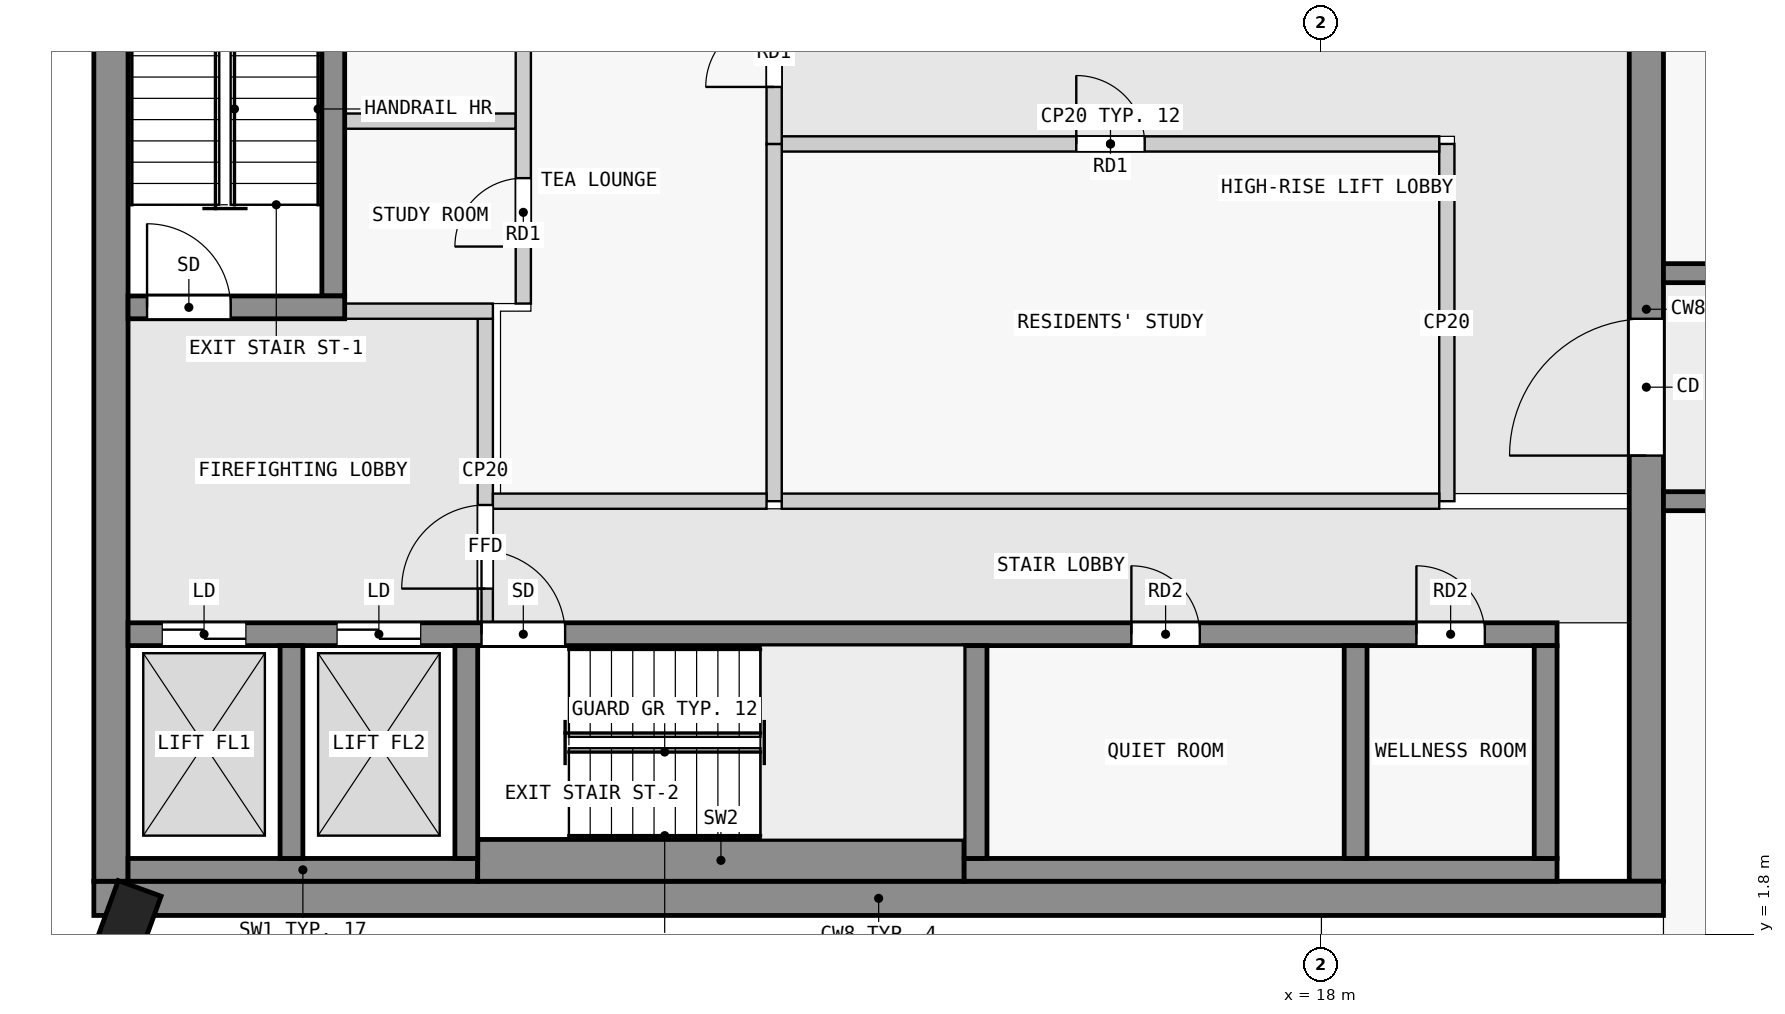
"""IFC4 building model, lengths in metres.
Left out: names, types, materials, properties, quantities, classifications, styles, units other than length and angle.
Written with IfcOpenShell. Run it as: python <this file> out.ifc"""

import sys

from ifc_helpers import new_model, si_unit, direction, frame, frame_2d, origin, origin_2d, place, context, subcontext, project, spatial, rectangle, extrude, element, fill, save


model = new_model("IFC4")
c1 = context("Model", 3, precision=1e-05, world=origin(), true_north=direction((0.0, 1.0)))
c2 = subcontext(c1, "Body", "Model", "MODEL_VIEW")
j1 = project(units=[si_unit("LENGTHUNIT", "METRE"), si_unit("PLANEANGLEUNIT", "RADIAN")], contexts=[c1])
p1 = place(None, origin())
s1 = spatial("IfcSite", under=j1, at=p1, CompositionType="ELEMENT")
p2 = place(p1, origin())
s2 = spatial("IfcBuilding", under=s1, at=p2, CompositionType="ELEMENT")
p3 = place(p2, frame((0.0, 0.0, 273.9)))
s3 = spatial("IfcBuildingStorey", under=s2, at=p3, CompositionType="ELEMENT", Elevation=273.9)
p4 = place(p3, frame((2.213, 1.748, 0.0), z_axis=(0.0, 0.0, 1.0), x_axis=(-0.939664280925, 0.342097996418, 0.0)))
e1 = element("IfcColumn", 1, at=p4, inside=s3, PredefinedType="COLUMN", context=c2, shape_type="SweptSolid", body=[
    extrude(rectangle(XDim=0.6, YDim=1.4, at=origin_2d()), origin(), (0.0, 0.0, 1.0), 3.5),
])
p5 = place(p3, frame((1.85, 2.275, 0.0), z_axis=(0.0, 0.0, 1.0), x_axis=(1.0, 0.0, 0.0)))
e2 = element("IfcWall", 2, at=p5, inside=s3, PredefinedType="SHEAR", context=c2, shape_type="SweptSolid", body=[
    extrude(rectangle(XDim=20.65, YDim=0.45, at=frame_2d((10.325, 0.0))), origin(), (0.0, 0.0, 1.0), 3.25),
])
p6 = place(p3, frame((2.075, 2.5, 0.0), z_axis=(0.0, 0.0, 1.0), x_axis=(0.0, 1.0, 0.0)))
e3 = element("IfcWall", 3, at=p6, inside=s3, PredefinedType="SHEAR", context=c2, shape_type="SweptSolid", body=[
    extrude(rectangle(XDim=15.05, YDim=0.45, at=frame_2d((7.525, 0.0))), origin(), (0.0, 0.0, 1.0), 3.25),
])
p7 = place(p3, frame((22.275, 2.5, 0.0), z_axis=(0.0, 0.0, 1.0), x_axis=(0.0, 1.0, 0.0)))
e4 = element("IfcWall", 4, at=p7, inside=s3, PredefinedType="SHEAR", context=c2, shape_type="SweptSolid", body=[
    extrude(rectangle(XDim=15.05, YDim=0.45, at=frame_2d((7.525, 0.0))), origin(), (0.0, 0.0, 1.0), 3.25),
])
p8 = place(p7, frame((5.6, 0.0, 0.0)))
e5 = element("IfcOpeningElement", 5, at=p8, cuts=e4, PredefinedType="OPENING", context=c2, shape_type="SweptSolid", body=[
    extrude(rectangle(XDim=1.8, YDim=2.1, at=frame_2d((0.9, 1.05))), frame((0.0, 0.235, 0.0), z_axis=(0.0, -1.0, 0.0), x_axis=(1.0, 0.0, 0.0)), (0.0, 0.0, 1.0), 0.47),
])
p9 = place(p3, frame((2.3, 2.65, 0.0), z_axis=(0.0, 0.0, 1.0), x_axis=(1.0, 0.0, 0.0)))
e6 = element("IfcWall", 6, at=p9, inside=s3, PredefinedType="SHEAR", context=c2, shape_type="SweptSolid", body=[
    extrude(rectangle(XDim=4.6, YDim=0.3, at=frame_2d((2.3, 0.0))), origin(), (0.0, 0.0, 1.0), 3.25),
])
p10 = place(p3, frame((6.9, 2.775, 0.0), z_axis=(0.0, 0.0, 1.0), x_axis=(1.0, 0.0, 0.0)))
e7 = element("IfcWall", 7, at=p10, inside=s3, PredefinedType="SHEAR", context=c2, shape_type="SweptSolid", body=[
    extrude(rectangle(XDim=6.4, YDim=0.55, at=frame_2d((3.2, 0.0))), origin(), (0.0, 0.0, 1.0), 3.25),
])
p11 = place(p3, frame((13.3, 2.65, 0.0), z_axis=(0.0, 0.0, 1.0), x_axis=(1.0, 0.0, 0.0)))
e8 = element("IfcWall", 8, at=p11, inside=s3, PredefinedType="SHEAR", context=c2, shape_type="SweptSolid", body=[
    extrude(rectangle(XDim=7.8, YDim=0.3, at=frame_2d((3.9, 0.0))), origin(), (0.0, 0.0, 1.0), 3.25),
])
for number, where, z_axis, x_axis in (
    (9, (4.45, 2.8, 0.0), (0.0, 0.0, 1.0), (0.0, 1.0, 0.0)),
    (10, (6.75, 2.8, 0.0), (0.0, 0.0, 1.0), (0.0, 1.0, 0.0)),
    (11, (13.45, 2.8, 0.0), (0.0, 0.0, 1.0), (0.0, 1.0, 0.0)),
    (12, (18.45, 2.8, 0.0), (0.0, 0.0, 1.0), (0.0, 1.0, 0.0)),
    (13, (20.95, 2.8, 0.0), (0.0, 0.0, 1.0), (0.0, 1.0, 0.0)),
):
    element("IfcWall", number, at=place(p3, frame(where, z_axis=z_axis, x_axis=x_axis)), inside=s3, PredefinedType="SHEAR", context=c2, shape_type="SweptSolid", body=[
        extrude(rectangle(XDim=2.8, YDim=0.3, at=frame_2d((1.4, 0.0))), origin(), (0.0, 0.0, 1.0), 3.25),
    ])
p12 = place(p3, frame((2.3, 5.75, 0.0), z_axis=(0.0, 0.0, 1.0), x_axis=(1.0, 0.0, 0.0)))
e14 = element("IfcWall", 14, at=p12, inside=s3, PredefinedType="SHEAR", context=c2, shape_type="SweptSolid", body=[
    extrude(rectangle(XDim=18.8, YDim=0.3, at=frame_2d((9.4, 0.0))), origin(), (0.0, 0.0, 1.0), 3.25),
])
p13 = place(p12, frame((4.65, 0.0, 0.0)))
e15 = element("IfcOpeningElement", 15, at=p13, cuts=e14, PredefinedType="OPENING", context=c2, shape_type="SweptSolid", body=[
    extrude(rectangle(XDim=1.1, YDim=2.1, at=frame_2d((0.55, 1.05))), frame((0.0, 0.16, 0.0), z_axis=(0.0, -1.0, 0.0), x_axis=(1.0, 0.0, 0.0)), (0.0, 0.0, 1.0), 0.32),
])
p14 = place(p12, frame((0.45, 0.0, 0.0)))
e16 = element("IfcOpeningElement", 16, at=p14, cuts=e14, PredefinedType="OPENING", context=c2, shape_type="SweptSolid", body=[
    extrude(rectangle(XDim=1.1, YDim=2.1, at=frame_2d((0.55, 1.05))), frame((0.0, 0.16, 0.0), z_axis=(0.0, -1.0, 0.0), x_axis=(1.0, 0.0, 0.0)), (0.0, 0.0, 1.0), 0.32),
])
p15 = place(p12, frame((2.75, 0.0, 0.0)))
e17 = element("IfcOpeningElement", 17, at=p15, cuts=e14, PredefinedType="OPENING", context=c2, shape_type="SweptSolid", body=[
    extrude(rectangle(XDim=1.1, YDim=2.1, at=frame_2d((0.55, 1.05))), frame((0.0, 0.16, 0.0), z_axis=(0.0, -1.0, 0.0), x_axis=(1.0, 0.0, 0.0)), (0.0, 0.0, 1.0), 0.32),
])
p16 = place(p12, frame((13.2, 0.0, 0.0)))
e18 = element("IfcOpeningElement", 18, at=p16, cuts=e14, PredefinedType="OPENING", context=c2, shape_type="SweptSolid", body=[
    extrude(rectangle(XDim=0.9, YDim=2.1, at=frame_2d((0.45, 1.05))), frame((0.0, 0.16, 0.0), z_axis=(0.0, -1.0, 0.0), x_axis=(1.0, 0.0, 0.0)), (0.0, 0.0, 1.0), 0.32),
])
p17 = place(p12, frame((16.95, 0.0, 0.0)))
e19 = element("IfcOpeningElement", 19, at=p17, cuts=e14, PredefinedType="OPENING", context=c2, shape_type="SweptSolid", body=[
    extrude(rectangle(XDim=0.9, YDim=2.1, at=frame_2d((0.45, 1.05))), frame((0.0, 0.16, 0.0), z_axis=(0.0, -1.0, 0.0), x_axis=(1.0, 0.0, 0.0)), (0.0, 0.0, 1.0), 0.32),
])
p18 = place(p3, frame((2.3, 10.05, 0.0), z_axis=(0.0, 0.0, 1.0), x_axis=(1.0, 0.0, 0.0)))
e20 = element("IfcWall", 20, at=p18, inside=s3, PredefinedType="SHEAR", context=c2, shape_type="SweptSolid", body=[
    extrude(rectangle(XDim=2.85, YDim=0.3, at=frame_2d((1.425, 0.0))), origin(), (0.0, 0.0, 1.0), 3.25),
])
p19 = place(p18, frame((0.25, 0.0, 0.0)))
e21 = element("IfcOpeningElement", 21, at=p19, cuts=e20, PredefinedType="OPENING", context=c2, shape_type="SweptSolid", body=[
    extrude(rectangle(XDim=1.1, YDim=2.1, at=frame_2d((0.55, 1.05))), frame((0.0, 0.16, 0.0), z_axis=(0.0, -1.0, 0.0), x_axis=(1.0, 0.0, 0.0)), (0.0, 0.0, 1.0), 0.32),
])
p20 = place(p3, frame((5.0, 10.2, 0.0), z_axis=(0.0, 0.0, 1.0), x_axis=(0.0, 1.0, 0.0)))
e22 = element("IfcWall", 22, at=p20, inside=s3, PredefinedType="SHEAR", context=c2, shape_type="SweptSolid", body=[
    extrude(rectangle(XDim=6.4, YDim=0.3, at=frame_2d((3.2, 0.0))), origin(), (0.0, 0.0, 1.0), 3.25),
])
p21 = place(p3, frame((22.5, 7.5, 0.0), z_axis=(0.0, 0.0, 1.0), x_axis=(1.0, 0.0, 0.0)))
e23 = element("IfcWall", 23, at=p21, inside=s3, PredefinedType="SHEAR", context=c2, shape_type="SweptSolid", body=[
    extrude(rectangle(XDim=22.5, YDim=0.25, at=frame_2d((11.25, 0.0))), origin(), (0.0, 0.0, 1.0), 3.25),
])
p22 = place(p21, frame((1.85, 0.0, 0.0)))
e24 = element("IfcOpeningElement", 24, at=p22, cuts=e23, PredefinedType="OPENING", context=c2, shape_type="SweptSolid", body=[
    extrude(rectangle(XDim=0.9, YDim=2.1, at=frame_2d((0.45, 1.05))), frame((0.0, 0.135, 0.0), z_axis=(0.0, -1.0, 0.0), x_axis=(1.0, 0.0, 0.0)), (0.0, 0.0, 1.0), 0.27),
])
p23 = place(p21, frame((6.25, 0.0, 0.0)))
e25 = element("IfcOpeningElement", 25, at=p23, cuts=e23, PredefinedType="OPENING", context=c2, shape_type="SweptSolid", body=[
    extrude(rectangle(XDim=1.0, YDim=2.1, at=frame_2d((0.5, 1.05))), frame((0.0, 0.135, 0.0), z_axis=(0.0, -1.0, 0.0), x_axis=(1.0, 0.0, 0.0)), (0.0, 0.0, 1.0), 0.27),
])
p24 = place(p21, frame((10.35, 0.0, 0.0)))
e26 = element("IfcOpeningElement", 26, at=p24, cuts=e23, PredefinedType="OPENING", context=c2, shape_type="SweptSolid", body=[
    extrude(rectangle(XDim=1.8, YDim=2.1, at=frame_2d((0.9, 1.05))), frame((0.0, 0.135, 0.0), z_axis=(0.0, -1.0, 0.0), x_axis=(1.0, 0.0, 0.0)), (0.0, 0.0, 1.0), 0.27),
])
p25 = place(p21, frame((16.85, 0.0, 0.0)))
e27 = element("IfcOpeningElement", 27, at=p25, cuts=e23, PredefinedType="OPENING", context=c2, shape_type="SweptSolid", body=[
    extrude(rectangle(XDim=1.0, YDim=2.1, at=frame_2d((0.5, 1.05))), frame((0.0, 0.135, 0.0), z_axis=(0.0, -1.0, 0.0), x_axis=(1.0, 0.0, 0.0)), (0.0, 0.0, 1.0), 0.27),
])
p26 = place(p3, frame((22.5, 10.5, 0.0), z_axis=(0.0, 0.0, 1.0), x_axis=(1.0, 0.0, 0.0)))
e28 = element("IfcWall", 28, at=p26, inside=s3, PredefinedType="SHEAR", context=c2, shape_type="SweptSolid", body=[
    extrude(rectangle(XDim=22.5, YDim=0.25, at=frame_2d((11.25, 0.0))), origin(), (0.0, 0.0, 1.0), 3.25),
])
p27 = place(p26, frame((1.85, 0.0, 0.0)))
e29 = element("IfcOpeningElement", 29, at=p27, cuts=e28, PredefinedType="OPENING", context=c2, shape_type="SweptSolid", body=[
    extrude(rectangle(XDim=0.9, YDim=2.1, at=frame_2d((0.45, 1.05))), frame((0.0, 0.135, 0.0), z_axis=(0.0, -1.0, 0.0), x_axis=(1.0, 0.0, 0.0)), (0.0, 0.0, 1.0), 0.27),
])
p28 = place(p26, frame((10.05, 0.0, 0.0)))
e30 = element("IfcOpeningElement", 30, at=p28, cuts=e28, PredefinedType="OPENING", context=c2, shape_type="SweptSolid", body=[
    extrude(rectangle(XDim=1.0, YDim=2.1, at=frame_2d((0.5, 1.05))), frame((0.0, 0.135, 0.0), z_axis=(0.0, -1.0, 0.0), x_axis=(1.0, 0.0, 0.0)), (0.0, 0.0, 1.0), 0.27),
])
p29 = place(p26, frame((18.75, 0.0, 0.0)))
e31 = element("IfcOpeningElement", 31, at=p29, cuts=e28, PredefinedType="OPENING", context=c2, shape_type="SweptSolid", body=[
    extrude(rectangle(XDim=0.9, YDim=2.1, at=frame_2d((0.45, 1.05))), frame((0.0, 0.135, 0.0), z_axis=(0.0, -1.0, 0.0), x_axis=(1.0, 0.0, 0.0)), (0.0, 0.0, 1.0), 0.27),
])
p30 = place(p26, frame((20.95, 0.0, 0.0)))
e32 = element("IfcOpeningElement", 32, at=p30, cuts=e28, PredefinedType="OPENING", context=c2, shape_type="SweptSolid", body=[
    extrude(rectangle(XDim=1.0, YDim=2.1, at=frame_2d((0.5, 1.05))), frame((0.0, 0.135, 0.0), z_axis=(0.0, -1.0, 0.0), x_axis=(1.0, 0.0, 0.0)), (0.0, 0.0, 1.0), 0.27),
])
p31 = place(p3, frame((7.0, 5.9, 0.0), z_axis=(0.0, 0.0, 1.0), x_axis=(0.0, 1.0, 0.0)))
e33 = element("IfcWall", 33, at=p31, inside=s3, PredefinedType="PARTITIONING", context=c2, shape_type="SweptSolid", body=[
    extrude(rectangle(XDim=4.0, YDim=0.2, at=frame_2d((2.0, 0.0))), origin(), (0.0, 0.0, 1.0), 3.25),
])
p32 = place(p31, frame((0.45, 0.0, 0.0)))
e34 = element("IfcOpeningElement", 34, at=p32, cuts=e33, PredefinedType="OPENING", context=c2, shape_type="SweptSolid", body=[
    extrude(rectangle(XDim=1.1, YDim=2.1, at=frame_2d((0.55, 1.05))), frame((0.0, 0.11, 0.0), z_axis=(0.0, -1.0, 0.0), x_axis=(1.0, 0.0, 0.0)), (0.0, 0.0, 1.0), 0.22),
])
p33 = place(p3, frame((5.15, 10.0, 0.0), z_axis=(0.0, 0.0, 1.0), x_axis=(1.0, 0.0, 0.0)))
e35 = element("IfcWall", 35, at=p33, inside=s3, PredefinedType="PARTITIONING", context=c2, shape_type="SweptSolid", body=[
    extrude(rectangle(XDim=1.95, YDim=0.2, at=frame_2d((0.975, 0.0))), origin(), (0.0, 0.0, 1.0), 3.25),
])
p34 = place(p3, frame((7.1, 7.5, 0.0), z_axis=(0.0, 0.0, 1.0), x_axis=(1.0, 0.0, 0.0)))
e36 = element("IfcWall", 36, at=p34, inside=s3, PredefinedType="PARTITIONING", context=c2, shape_type="SweptSolid", body=[
    extrude(rectangle(XDim=3.6, YDim=0.2, at=frame_2d((1.8, 0.0))), origin(), (0.0, 0.0, 1.0), 3.25),
])
p35 = place(p3, frame((10.8, 12.2, 0.0), z_axis=(0.0, 0.0, 1.0), x_axis=(0.0, 1.0, 0.0)))
e37 = element("IfcWall", 37, at=p35, inside=s3, PredefinedType="PARTITIONING", context=c2, shape_type="SweptSolid", body=[
    extrude(rectangle(XDim=2.4, YDim=0.2, at=frame_2d((1.2, 0.0))), origin(), (0.0, 0.0, 1.0), 3.25),
])
p36 = place(p35, frame((0.75, 0.0, 0.0)))
e38 = element("IfcOpeningElement", 38, at=p36, cuts=e37, PredefinedType="OPENING", context=c2, shape_type="SweptSolid", body=[
    extrude(rectangle(XDim=0.9, YDim=2.1, at=frame_2d((0.45, 1.05))), frame((0.0, 0.11, 0.0), z_axis=(0.0, -1.0, 0.0), x_axis=(1.0, 0.0, 0.0)), (0.0, 0.0, 1.0), 0.22),
])
p37 = place(p3, frame((10.8, 7.5, 0.0), z_axis=(0.0, 0.0, 1.0), x_axis=(0.0, 1.0, 0.0)))
e39 = element("IfcWall", 39, at=p37, inside=s3, PredefinedType="PARTITIONING", context=c2, shape_type="SweptSolid", body=[
    extrude(rectangle(XDim=4.7, YDim=0.2, at=frame_2d((2.35, 0.0))), origin(), (0.0, 0.0, 1.0), 3.25),
])
p38 = place(p3, frame((10.9, 7.5, 0.0), z_axis=(0.0, 0.0, 1.0), x_axis=(1.0, 0.0, 0.0)))
e40 = element("IfcWall", 40, at=p38, inside=s3, PredefinedType="PARTITIONING", context=c2, shape_type="SweptSolid", body=[
    extrude(rectangle(XDim=8.65, YDim=0.2, at=frame_2d((4.325, 0.0))), origin(), (0.0, 0.0, 1.0), 3.25),
])
p39 = place(p3, frame((19.65, 7.5, 0.0), z_axis=(0.0, 0.0, 1.0), x_axis=(0.0, 1.0, 0.0)))
e41 = element("IfcWall", 41, at=p39, inside=s3, PredefinedType="PARTITIONING", context=c2, shape_type="SweptSolid", body=[
    extrude(rectangle(XDim=4.7, YDim=0.2, at=frame_2d((2.35, 0.0))), origin(), (0.0, 0.0, 1.0), 3.25),
])
p40 = place(p3, frame((10.9, 12.2, 0.0), z_axis=(0.0, 0.0, 1.0), x_axis=(1.0, 0.0, 0.0)))
e42 = element("IfcWall", 42, at=p40, inside=s3, PredefinedType="PARTITIONING", context=c2, shape_type="SweptSolid", body=[
    extrude(rectangle(XDim=8.65, YDim=0.2, at=frame_2d((4.325, 0.0))), origin(), (0.0, 0.0, 1.0), 3.25),
])
p41 = place(p40, frame((3.875, 0.0, 0.0)))
e43 = element("IfcOpeningElement", 43, at=p41, cuts=e42, PredefinedType="OPENING", context=c2, shape_type="SweptSolid", body=[
    extrude(rectangle(XDim=0.9, YDim=2.1, at=frame_2d((0.45, 1.05))), frame((0.0, 0.11, 0.0), z_axis=(0.0, -1.0, 0.0), x_axis=(1.0, 0.0, 0.0)), (0.0, 0.0, 1.0), 0.22),
])
p42 = place(p3, frame((7.5, 10.1, 0.0), z_axis=(0.0, 0.0, 1.0), x_axis=(0.0, 1.0, 0.0)))
e44 = element("IfcWall", 44, at=p42, inside=s3, PredefinedType="PARTITIONING", context=c2, shape_type="SweptSolid", body=[
    extrude(rectangle(XDim=7.45, YDim=0.2, at=frame_2d((3.725, 0.0))), origin(), (0.0, 0.0, 1.0), 3.25),
])
p43 = place(p42, frame((0.75, 0.0, 0.0)))
e45 = element("IfcOpeningElement", 45, at=p43, cuts=e44, PredefinedType="OPENING", context=c2, shape_type="SweptSolid", body=[
    extrude(rectangle(XDim=0.9, YDim=2.1, at=frame_2d((0.45, 1.05))), frame((0.0, 0.11, 0.0), z_axis=(0.0, -1.0, 0.0), x_axis=(1.0, 0.0, 0.0)), (0.0, 0.0, 1.0), 0.22),
])
p44 = place(p42, frame((4.475, 0.0, 0.0)))
e46 = element("IfcOpeningElement", 46, at=p44, cuts=e44, PredefinedType="OPENING", context=c2, shape_type="SweptSolid", body=[
    extrude(rectangle(XDim=0.9, YDim=2.1, at=frame_2d((0.45, 1.05))), frame((0.0, 0.11, 0.0), z_axis=(0.0, -1.0, 0.0), x_axis=(1.0, 0.0, 0.0)), (0.0, 0.0, 1.0), 0.22),
])
p45 = place(p3, frame((5.15, 12.5, 0.0), z_axis=(0.0, 0.0, 1.0), x_axis=(1.0, 0.0, 0.0)))
e47 = element("IfcWall", 47, at=p45, inside=s3, PredefinedType="PARTITIONING", context=c2, shape_type="SweptSolid", body=[
    extrude(rectangle(XDim=2.25, YDim=0.2, at=frame_2d((1.125, 0.0))), origin(), (0.0, 0.0, 1.0), 3.25),
])
p46 = place(p32, origin())
e48 = element("IfcDoor", 48, at=p46, inside=s3, OperationType="SINGLE_SWING_LEFT", PredefinedType="DOOR", context=c2, shape_type="SweptSolid", body=[
    extrude(rectangle(XDim=1.1, YDim=2.1, at=frame_2d((0.55, 1.05))), frame((0.0, 0.025, 0.0), z_axis=(0.0, -1.0, 0.0), x_axis=(1.0, 0.0, 0.0)), (0.0, 0.0, 1.0), 0.05),
])
fill(e34, e48)
p47 = place(p19, origin())
e49 = element("IfcDoor", 49, at=p47, inside=s3, OperationType="SINGLE_SWING_RIGHT", PredefinedType="DOOR", context=c2, shape_type="SweptSolid", body=[
    extrude(rectangle(XDim=1.1, YDim=2.1, at=frame_2d((0.55, 1.05))), frame((0.0, 0.025, 0.0), z_axis=(0.0, -1.0, 0.0), x_axis=(1.0, 0.0, 0.0)), (0.0, 0.0, 1.0), 0.05),
])
fill(e21, e49)
p48 = place(p36, origin())
e50 = element("IfcDoor", 50, at=p48, inside=s3, OperationType="SINGLE_SWING_LEFT", PredefinedType="DOOR", context=c2, shape_type="SweptSolid", body=[
    extrude(rectangle(XDim=0.9, YDim=2.1, at=frame_2d((0.45, 1.05))), frame((0.0, 0.025, 0.0), z_axis=(0.0, -1.0, 0.0), x_axis=(1.0, 0.0, 0.0)), (0.0, 0.0, 1.0), 0.05),
])
fill(e38, e50)
p49 = place(p41, origin())
e51 = element("IfcDoor", 51, at=p49, inside=s3, OperationType="SINGLE_SWING_LEFT", PredefinedType="DOOR", context=c2, shape_type="SweptSolid", body=[
    extrude(rectangle(XDim=0.9, YDim=2.1, at=frame_2d((0.45, 1.05))), frame((0.0, 0.025, 0.0), z_axis=(0.0, -1.0, 0.0), x_axis=(1.0, 0.0, 0.0)), (0.0, 0.0, 1.0), 0.05),
])
fill(e43, e51)
p50 = place(p13, origin())
e52 = element("IfcDoor", 52, at=p50, inside=s3, OperationType="SINGLE_SWING_LEFT", PredefinedType="DOOR", context=c2, shape_type="SweptSolid", body=[
    extrude(rectangle(XDim=1.1, YDim=2.1, at=frame_2d((0.55, 1.05))), frame((0.0, 0.025, 0.0), z_axis=(0.0, -1.0, 0.0), x_axis=(1.0, 0.0, 0.0)), (0.0, 0.0, 1.0), 0.05),
])
fill(e15, e52)
p51 = place(p14, origin())
e53 = element("IfcDoor", 53, at=p51, inside=s3, OperationType="DOUBLE_DOOR_SLIDING", PredefinedType="DOOR", context=c2, shape_type="SweptSolid", body=[
    extrude(rectangle(XDim=1.1, YDim=2.1, at=frame_2d((0.55, 1.05))), frame((0.0, 0.025, 0.0), z_axis=(0.0, -1.0, 0.0), x_axis=(1.0, 0.0, 0.0)), (0.0, 0.0, 1.0), 0.05),
])
fill(e16, e53)
p52 = place(p15, origin())
e54 = element("IfcDoor", 54, at=p52, inside=s3, OperationType="DOUBLE_DOOR_SLIDING", PredefinedType="DOOR", context=c2, shape_type="SweptSolid", body=[
    extrude(rectangle(XDim=1.1, YDim=2.1, at=frame_2d((0.55, 1.05))), frame((0.0, 0.025, 0.0), z_axis=(0.0, -1.0, 0.0), x_axis=(1.0, 0.0, 0.0)), (0.0, 0.0, 1.0), 0.05),
])
fill(e17, e54)
p53 = place(p8, origin())
e55 = element("IfcDoor", 55, at=p53, inside=s3, OperationType="DOUBLE_DOOR_SINGLE_SWING", PredefinedType="DOOR", context=c2, shape_type="SweptSolid", body=[
    extrude(rectangle(XDim=1.8, YDim=2.1, at=frame_2d((0.9, 1.05))), frame((0.0, 0.025, 0.0), z_axis=(0.0, -1.0, 0.0), x_axis=(1.0, 0.0, 0.0)), (0.0, 0.0, 1.0), 0.05),
])
fill(e5, e55)
p54 = place(p43, origin())
e56 = element("IfcDoor", 56, at=p54, inside=s3, OperationType="SINGLE_SWING_RIGHT", PredefinedType="DOOR", context=c2, shape_type="SweptSolid", body=[
    extrude(rectangle(XDim=0.9, YDim=2.1, at=frame_2d((0.45, 1.05))), frame((0.0, 0.025, 0.0), z_axis=(0.0, -1.0, 0.0), x_axis=(1.0, 0.0, 0.0)), (0.0, 0.0, 1.0), 0.05),
])
fill(e45, e56)
p55 = place(p16, origin())
e57 = element("IfcDoor", 57, at=p55, inside=s3, OperationType="SINGLE_SWING_LEFT", PredefinedType="DOOR", context=c2, shape_type="SweptSolid", body=[
    extrude(rectangle(XDim=0.9, YDim=2.1, at=frame_2d((0.45, 1.05))), frame((0.0, 0.025, 0.0), z_axis=(0.0, -1.0, 0.0), x_axis=(1.0, 0.0, 0.0)), (0.0, 0.0, 1.0), 0.05),
])
fill(e18, e57)
p56 = place(p17, origin())
e58 = element("IfcDoor", 58, at=p56, inside=s3, OperationType="SINGLE_SWING_LEFT", PredefinedType="DOOR", context=c2, shape_type="SweptSolid", body=[
    extrude(rectangle(XDim=0.9, YDim=2.1, at=frame_2d((0.45, 1.05))), frame((0.0, 0.025, 0.0), z_axis=(0.0, -1.0, 0.0), x_axis=(1.0, 0.0, 0.0)), (0.0, 0.0, 1.0), 0.05),
])
fill(e19, e58)
save(model, sys.argv[1])
